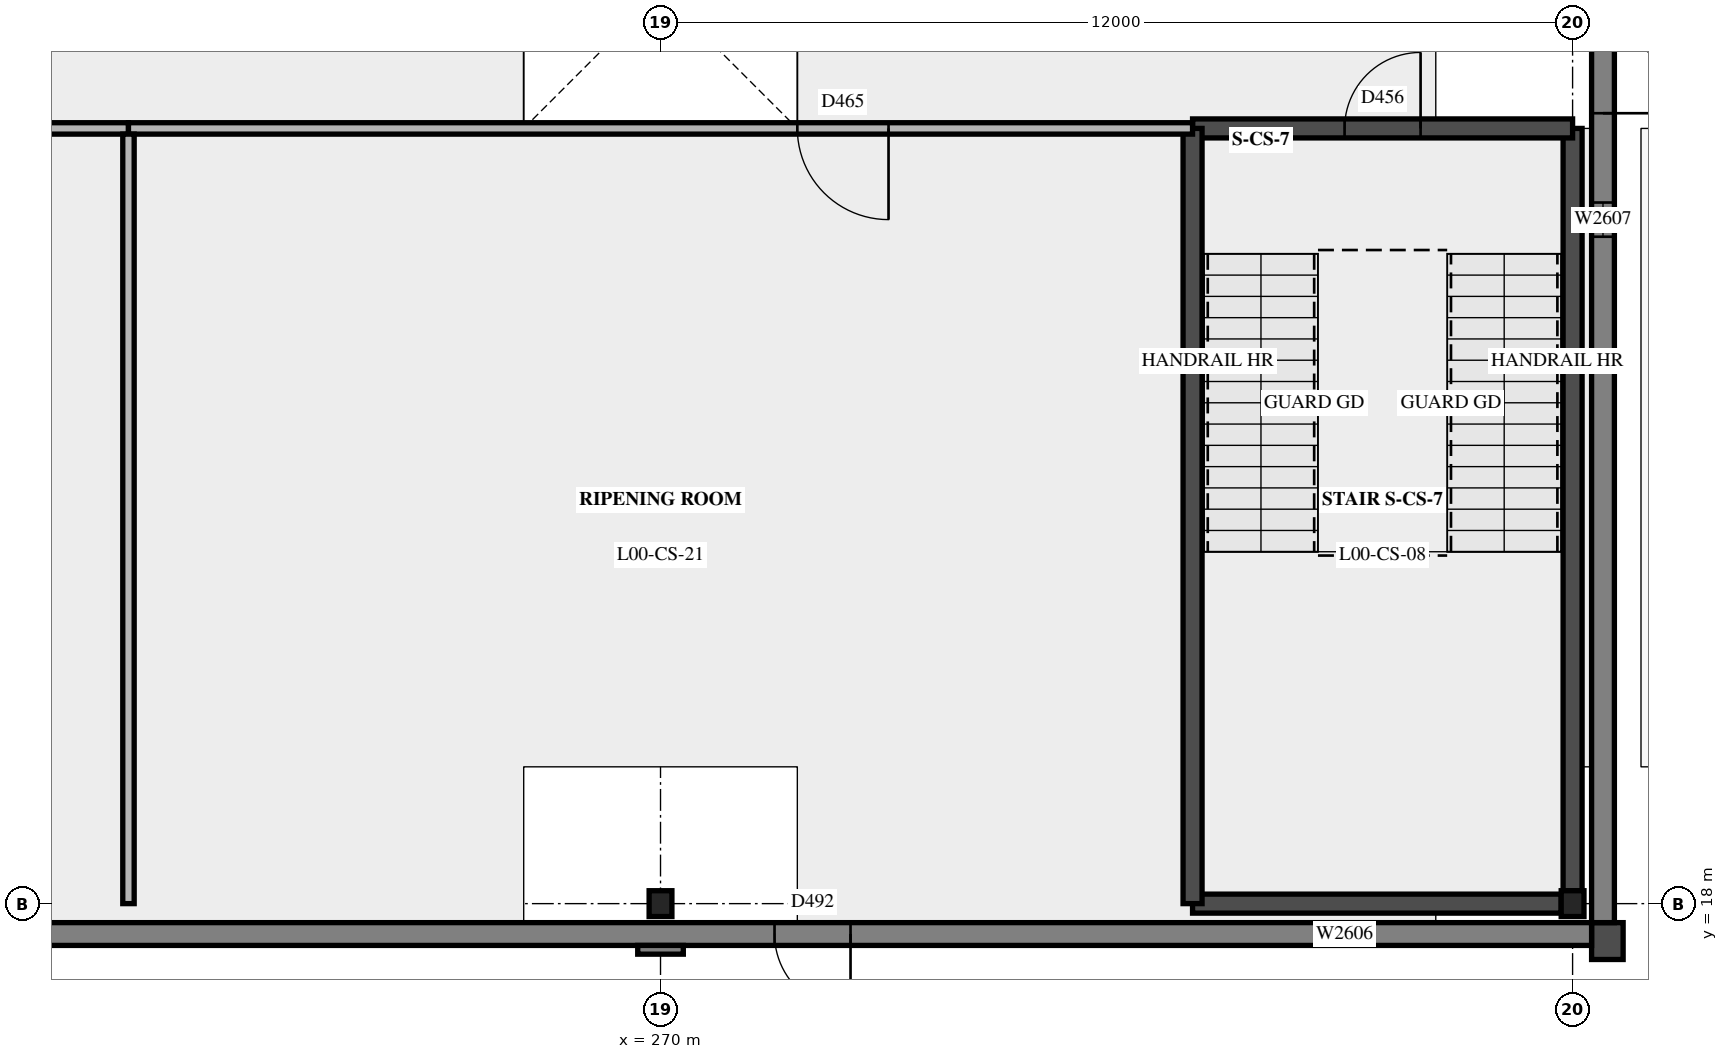
"""IFC4 building model, lengths in metres.
Left out: names, types, materials, properties, quantities, classifications, styles, units other than length and angle.
Written with IfcOpenShell. Run it as: python <this file> out.ifc"""

import sys

from ifc_helpers import new_model, si_unit, direction, frame, frame_2d, origin, origin_2d, place, context, subcontext, project, spatial, polyline, rectangle, i_section, outline, extrude, element, fill, save


model = new_model("IFC4")
c1 = context("Model", 3, precision=1e-05, world=origin(), true_north=direction((0.0, 1.0)))
c2 = subcontext(c1, "Body", "Model", "MODEL_VIEW")
j1 = project(units=[si_unit("LENGTHUNIT", "METRE"), si_unit("PLANEANGLEUNIT", "RADIAN")], contexts=[c1])
p1 = place(None, origin())
s1 = spatial("IfcSite", under=j1, at=p1, CompositionType="ELEMENT")
p2 = place(p1, origin())
s2 = spatial("IfcBuilding", under=s1, at=p2, CompositionType="ELEMENT")
p3 = place(p2, origin())
s3 = spatial("IfcBuildingStorey", under=s2, at=p3, CompositionType="ELEMENT", Elevation=0.0)
for number, where, z_axis, x_axis in (
    (1, (270.0, 18.0, 0.0), (0.0, 0.0, 1.0), (1.0, 0.0, 0.0)),
    (2, (282.0, 18.0, 0.0), (0.0, 0.0, 1.0), (1.0, 0.0, 0.0)),
):
    element("IfcColumn", number, at=place(p3, frame(where, z_axis=z_axis, x_axis=x_axis)), inside=s3, PredefinedType="COLUMN", context=c2, shape_type="SweptSolid", body=[
        extrude(i_section(OverallWidth=0.3, OverallDepth=0.34, WebThickness=0.012, FlangeThickness=0.021, at=origin_2d()), origin(), (0.0, 0.0, 1.0), 5.4),
    ])
p4 = place(p3, frame((277.0, 18.0, 0.0), z_axis=(0.0, 0.0, 1.0), x_axis=(1.0, 0.0, 0.0)))
e3 = element("IfcWall", 3, at=p4, inside=s3, PredefinedType="SHEAR", context=c2, shape_type="SweptSolid", body=[
    extrude(rectangle(XDim=4.85, YDim=0.25, at=frame_2d((2.425, 0.0))), origin(), (0.0, 0.0, 1.0), 5.4),
])
p5 = place(p3, frame((282.0, 18.17, 0.0), z_axis=(0.0, 0.0, 1.0), x_axis=(0.0, 1.0, 0.0)))
e4 = element("IfcWall", 4, at=p5, inside=s3, PredefinedType="SHEAR", context=c2, shape_type="SweptSolid", body=[
    extrude(rectangle(XDim=10.03, YDim=0.25, at=frame_2d((5.015, 0.0))), origin(), (0.0, 0.0, 1.0), 5.4),
])
p6 = place(p3, frame((277.0, 28.2, 0.0), z_axis=(0.0, 0.0, 1.0), x_axis=(1.0, 0.0, 0.0)))
e5 = element("IfcWall", 5, at=p6, inside=s3, PredefinedType="SHEAR", context=c2, shape_type="SweptSolid", body=[
    extrude(rectangle(XDim=5.0, YDim=0.25, at=frame_2d((2.5, 0.0))), origin(), (0.0, 0.0, 1.0), 5.4),
])
p7 = place(p6, frame((2.0, 0.0, 0.0)))
e6 = element("IfcOpeningElement", 6, at=p7, cuts=e5, PredefinedType="OPENING", context=c2, shape_type="SweptSolid", body=[
    extrude(rectangle(XDim=1.0, YDim=2.1, at=frame_2d((0.5, 1.05))), frame((0.0, 0.135, 0.0), z_axis=(0.0, -1.0, 0.0), x_axis=(1.0, 0.0, 0.0)), (0.0, 0.0, 1.0), 0.27),
])
p8 = place(p3, frame((277.0, 18.0, 0.0), z_axis=(0.0, 0.0, 1.0), x_axis=(0.0, 1.0, 0.0)))
e7 = element("IfcWall", 7, at=p8, inside=s3, PredefinedType="SHEAR", context=c2, shape_type="SweptSolid", body=[
    extrude(rectangle(XDim=10.2, YDim=0.25, at=frame_2d((5.1, 0.0))), origin(), (0.0, 0.0, 1.0), 5.4),
])
p9 = place(p3, frame((282.25, 17.508, 0.0), z_axis=(0.0, 0.0, 1.0), x_axis=(1.0, 0.0, 0.0)))
e8 = element("IfcWall", 8, at=p9, inside=s3, PredefinedType="SOLIDWALL", context=c2, shape_type="SweptSolid", body=[
    extrude(rectangle(XDim=0.415, YDim=0.485, at=frame_2d((0.208, 0.0))), origin(), (0.0, 0.0, 1.0), 5.01),
])
p10 = place(p3, frame((197.75, 17.6, 0.0), z_axis=(0.0, 0.0, 1.0), x_axis=(1.0, 0.0, 0.0)))
e9 = element("IfcWall", 9, at=p10, inside=s3, PredefinedType="SOLIDWALL", context=c2, shape_type="SweptSolid", body=[
    extrude(rectangle(XDim=84.5, YDim=0.3, at=frame_2d((42.25, 0.0))), origin(), (0.0, 0.0, 1.0), 5.4),
])
p11 = place(p10, frame((19.75, 0.0, 0.0), z_axis=(0.0, 0.0, 1.0), x_axis=(-1.0, 0.0, 0.0)))
e10 = element("IfcOpeningElement", 10, at=p11, cuts=e9, PredefinedType="OPENING", context=c2, shape_type="SweptSolid", body=[
    extrude(rectangle(XDim=1.0, YDim=2.1, at=frame_2d((0.5, 1.05))), frame((0.0, 0.16, 0.0), z_axis=(0.0, -1.0, 0.0), x_axis=(1.0, 0.0, 0.0)), (0.0, 0.0, 1.0), 0.32),
])
p12 = place(p10, frame((31.75, 0.0, 0.0), z_axis=(0.0, 0.0, 1.0), x_axis=(-1.0, 0.0, 0.0)))
e11 = element("IfcOpeningElement", 11, at=p12, cuts=e9, PredefinedType="OPENING", context=c2, shape_type="SweptSolid", body=[
    extrude(rectangle(XDim=1.0, YDim=2.1, at=frame_2d((0.5, 1.05))), frame((0.0, 0.16, 0.0), z_axis=(0.0, -1.0, 0.0), x_axis=(1.0, 0.0, 0.0)), (0.0, 0.0, 1.0), 0.32),
])
p13 = place(p10, frame((53.75, 0.0, 0.0), z_axis=(0.0, 0.0, 1.0), x_axis=(-1.0, 0.0, 0.0)))
e12 = element("IfcOpeningElement", 12, at=p13, cuts=e9, PredefinedType="OPENING", context=c2, shape_type="SweptSolid", body=[
    extrude(rectangle(XDim=1.0, YDim=2.1, at=frame_2d((0.5, 1.05))), frame((0.0, 0.16, 0.0), z_axis=(0.0, -1.0, 0.0), x_axis=(1.0, 0.0, 0.0)), (0.0, 0.0, 1.0), 0.32),
])
p14 = place(p10, frame((74.75, 0.0, 0.0), z_axis=(0.0, 0.0, 1.0), x_axis=(-1.0, 0.0, 0.0)))
e13 = element("IfcOpeningElement", 13, at=p14, cuts=e9, PredefinedType="OPENING", context=c2, shape_type="SweptSolid", body=[
    extrude(rectangle(XDim=1.0, YDim=2.1, at=frame_2d((0.5, 1.05))), frame((0.0, 0.16, 0.0), z_axis=(0.0, -1.0, 0.0), x_axis=(1.0, 0.0, 0.0)), (0.0, 0.0, 1.0), 0.32),
])
p15 = place(p10, frame((9.025, 0.0, 1.8)))
e14 = element("IfcOpeningElement", 14, at=p15, cuts=e9, PredefinedType="OPENING", context=c2, shape_type="SweptSolid", body=[
    extrude(rectangle(XDim=0.45, YDim=2.4, at=frame_2d((0.225, 1.2))), frame((0.0, 0.16, 0.0), z_axis=(0.0, -1.0, 0.0), x_axis=(1.0, 0.0, 0.0)), (0.0, 0.0, 1.0), 0.32),
])
p16 = place(p10, frame((33.025, 0.0, 1.8)))
e15 = element("IfcOpeningElement", 15, at=p16, cuts=e9, PredefinedType="OPENING", context=c2, shape_type="SweptSolid", body=[
    extrude(rectangle(XDim=0.45, YDim=2.4, at=frame_2d((0.225, 1.2))), frame((0.0, 0.16, 0.0), z_axis=(0.0, -1.0, 0.0), x_axis=(1.0, 0.0, 0.0)), (0.0, 0.0, 1.0), 0.32),
])
p17 = place(p10, frame((45.025, 0.0, 1.8)))
e16 = element("IfcOpeningElement", 16, at=p17, cuts=e9, PredefinedType="OPENING", context=c2, shape_type="SweptSolid", body=[
    extrude(rectangle(XDim=0.45, YDim=2.4, at=frame_2d((0.225, 1.2))), frame((0.0, 0.16, 0.0), z_axis=(0.0, -1.0, 0.0), x_axis=(1.0, 0.0, 0.0)), (0.0, 0.0, 1.0), 0.32),
])
p18 = place(p10, frame((57.025, 0.0, 1.8)))
e17 = element("IfcOpeningElement", 17, at=p18, cuts=e9, PredefinedType="OPENING", context=c2, shape_type="SweptSolid", body=[
    extrude(rectangle(XDim=0.45, YDim=2.4, at=frame_2d((0.225, 1.2))), frame((0.0, 0.16, 0.0), z_axis=(0.0, -1.0, 0.0), x_axis=(1.0, 0.0, 0.0)), (0.0, 0.0, 1.0), 0.32),
])
p19 = place(p10, frame((81.025, 0.0, 1.8)))
e18 = element("IfcOpeningElement", 18, at=p19, cuts=e9, PredefinedType="OPENING", context=c2, shape_type="SweptSolid", body=[
    extrude(rectangle(XDim=0.45, YDim=2.4, at=frame_2d((0.225, 1.2))), frame((0.0, 0.16, 0.0), z_axis=(0.0, -1.0, 0.0), x_axis=(1.0, 0.0, 0.0)), (0.0, 0.0, 1.0), 0.32),
])
p20 = place(p3, frame((269.7, 17.393, 0.0), z_axis=(0.0, 0.0, 1.0), x_axis=(1.0, 0.0, 0.0)))
e19 = element("IfcWall", 19, at=p20, inside=s3, PredefinedType="SOLIDWALL", context=c2, shape_type="SweptSolid", body=[
    extrude(rectangle(XDim=0.6, YDim=0.115, at=frame_2d((0.3, 0.0))), origin(), (0.0, 0.0, 1.0), 5.4),
])
p21 = place(p3, frame((282.4, 17.75, 0.0), z_axis=(0.0, 0.0, 1.0), x_axis=(0.0, 1.0, 0.0)))
e20 = element("IfcWall", 20, at=p21, inside=s3, PredefinedType="SOLIDWALL", context=c2, shape_type="SweptSolid", body=[
    extrude(rectangle(XDim=48.5, YDim=0.3, at=frame_2d((24.25, 0.0))), origin(), (0.0, 0.0, 1.0), 5.4),
])
p22 = place(p21, frame((11.65, 0.0, 0.0), z_axis=(0.0, 0.0, 1.0), x_axis=(-1.0, 0.0, 0.0)))
e21 = element("IfcOpeningElement", 21, at=p22, cuts=e20, PredefinedType="OPENING", context=c2, shape_type="SweptSolid", body=[
    extrude(rectangle(XDim=1.0, YDim=2.1, at=frame_2d((0.5, 1.05))), frame((0.0, 0.16, 0.0), z_axis=(0.0, -1.0, 0.0), x_axis=(1.0, 0.0, 0.0)), (0.0, 0.0, 1.0), 0.32),
])
p23 = place(p21, frame((23.85, 0.0, 0.0), z_axis=(0.0, 0.0, 1.0), x_axis=(-1.0, 0.0, 0.0)))
e22 = element("IfcOpeningElement", 22, at=p23, cuts=e20, PredefinedType="OPENING", context=c2, shape_type="SweptSolid", body=[
    extrude(rectangle(XDim=1.0, YDim=2.1, at=frame_2d((0.5, 1.05))), frame((0.0, 0.16, 0.0), z_axis=(0.0, -1.0, 0.0), x_axis=(1.0, 0.0, 0.0)), (0.0, 0.0, 1.0), 0.32),
])
p24 = place(p21, frame((9.025, 0.0, 1.8)))
e23 = element("IfcOpeningElement", 23, at=p24, cuts=e20, PredefinedType="OPENING", context=c2, shape_type="SweptSolid", body=[
    extrude(rectangle(XDim=0.45, YDim=2.4, at=frame_2d((0.225, 1.2))), frame((0.0, 0.16, 0.0), z_axis=(0.0, -1.0, 0.0), x_axis=(1.0, 0.0, 0.0)), (0.0, 0.0, 1.0), 0.32),
])
p25 = place(p21, frame((33.025, 0.0, 1.8)))
e24 = element("IfcOpeningElement", 24, at=p25, cuts=e20, PredefinedType="OPENING", context=c2, shape_type="SweptSolid", body=[
    extrude(rectangle(XDim=0.45, YDim=2.4, at=frame_2d((0.225, 1.2))), frame((0.0, 0.16, 0.0), z_axis=(0.0, -1.0, 0.0), x_axis=(1.0, 0.0, 0.0)), (0.0, 0.0, 1.0), 0.32),
])
p26 = place(p21, frame((45.025, 0.0, 1.8)))
e25 = element("IfcOpeningElement", 25, at=p26, cuts=e20, PredefinedType="OPENING", context=c2, shape_type="SweptSolid", body=[
    extrude(rectangle(XDim=0.45, YDim=2.4, at=frame_2d((0.225, 1.2))), frame((0.0, 0.16, 0.0), z_axis=(0.0, -1.0, 0.0), x_axis=(1.0, 0.0, 0.0)), (0.0, 0.0, 1.0), 0.32),
])
p27 = place(p3, frame((239.0, 28.2, 0.0), z_axis=(0.0, 0.0, 1.0), x_axis=(1.0, 0.0, 0.0)))
e26 = element("IfcWall", 26, at=p27, inside=s3, PredefinedType="PARTITIONING", context=c2, shape_type="SweptSolid", body=[
    extrude(outline(polyline([(0.0, 0.0), (24.0, 0.0), (24.0, 5.15), (23.905, 5.15), (23.9, 4.63), (23.7, 4.63), (23.695, 5.15), (21.505, 5.15), (21.5, 4.63), (21.3, 4.63), (21.295, 5.15), (19.1, 5.15), (19.095, 4.68), (18.905, 4.68), (18.9, 5.15), (16.705, 5.15), (16.7, 4.63), (16.5, 4.63), (16.495, 5.15), (14.305, 5.15), (14.3, 4.63), (14.1, 4.63), (14.095, 5.15), (11.905, 5.15), (11.9, 4.63), (11.7, 4.63), (11.695, 5.15), (9.505, 5.15), (9.5, 4.63), (9.3, 4.63), (9.295, 5.15), (7.1, 5.15), (7.095, 4.68), (6.905, 4.68), (6.9, 5.15), (4.705, 5.15), (4.7, 4.63), (4.5, 4.63), (4.495, 5.15), (2.305, 5.15), (2.3, 4.63), (2.1, 4.63), (2.095, 5.15), (0.0, 5.15), (0.0, 0.0)])), frame((0.0, 0.075, 0.0), z_axis=(0.0, -1.0, 0.0), x_axis=(1.0, 0.0, 0.0)), (0.0, 0.0, 1.0), 0.15),
])
p28 = place(p27, frame((11.4, 0.0, 0.0)))
e27 = element("IfcOpeningElement", 27, at=p28, cuts=e26, PredefinedType="OPENING", context=c2, shape_type="SweptSolid", body=[
    extrude(rectangle(XDim=1.2, YDim=2.4, at=frame_2d((0.6, 1.2))), frame((0.0, 0.085, 0.0), z_axis=(0.0, -1.0, 0.0), x_axis=(1.0, 0.0, 0.0)), (0.0, 0.0, 1.0), 0.17),
])
p29 = place(p3, frame((263.0, 28.2, 0.0), z_axis=(0.0, 0.0, 1.0), x_axis=(1.0, 0.0, 0.0)))
e28 = element("IfcWall", 28, at=p29, inside=s3, PredefinedType="PARTITIONING", context=c2, shape_type="SweptSolid", body=[
    extrude(outline(polyline([(0.0, 0.0), (14.0, 0.0), (14.0, 5.15), (11.905, 5.15), (11.9, 4.63), (11.7, 4.63), (11.695, 5.15), (9.505, 5.15), (9.5, 4.63), (9.3, 4.63), (9.295, 5.15), (7.1, 5.15), (7.095, 4.68), (6.905, 4.68), (6.9, 5.15), (4.705, 5.15), (4.7, 4.63), (4.5, 4.63), (4.495, 5.15), (2.305, 5.15), (2.3, 4.63), (2.1, 4.63), (2.095, 5.15), (0.0, 5.15), (0.0, 0.0)])), frame((0.0, 0.075, 0.0), z_axis=(0.0, -1.0, 0.0), x_axis=(1.0, 0.0, 0.0)), (0.0, 0.0, 1.0), 0.15),
])
p30 = place(p29, frame((8.8, 0.0, 0.0)))
e29 = element("IfcOpeningElement", 29, at=p30, cuts=e28, PredefinedType="OPENING", context=c2, shape_type="SweptSolid", body=[
    extrude(rectangle(XDim=1.2, YDim=2.4, at=frame_2d((0.6, 1.2))), frame((0.0, 0.085, 0.0), z_axis=(0.0, -1.0, 0.0), x_axis=(1.0, 0.0, 0.0)), (0.0, 0.0, 1.0), 0.17),
])
p31 = place(p3, frame((263.0, 18.0, 0.0), z_axis=(0.0, 0.0, 1.0), x_axis=(0.0, 1.0, 0.0)))
e30 = element("IfcWall", 30, at=p31, inside=s3, PredefinedType="PARTITIONING", context=c2, shape_type="SweptSolid", body=[
    extrude(outline(polyline([(0.0, 0.0), (10.125, 0.0), (10.125, 5.15), (0.105, 5.15), (0.1, 4.63), (0.0, 4.63), (0.0, 0.0)])), frame((0.0, 0.075, 0.0), z_axis=(0.0, -1.0, 0.0), x_axis=(1.0, 0.0, 0.0)), (0.0, 0.0, 1.0), 0.15),
])
p32 = place(p14, origin())
e31 = element("IfcDoor", 31, at=p32, inside=s3, OperationType="SINGLE_SWING_LEFT", PredefinedType="DOOR", context=c2, shape_type="SweptSolid", body=[
    extrude(rectangle(XDim=1.0, YDim=2.1, at=frame_2d((0.5, 1.05))), frame((0.0, 0.025, 0.0), z_axis=(0.0, -1.0, 0.0), x_axis=(1.0, 0.0, 0.0)), (0.0, 0.0, 1.0), 0.05),
])
fill(e13, e31)
p33 = place(p19, origin())
e32 = element("IfcWindow", 32, at=p33, inside=s3, PartitioningType="SINGLE_PANEL", PredefinedType="WINDOW", context=c2, shape_type="SweptSolid", body=[
    extrude(rectangle(XDim=0.45, YDim=2.4, at=frame_2d((0.225, 1.2))), frame((0.0, 0.03, 0.0), z_axis=(0.0, -1.0, 0.0), x_axis=(1.0, 0.0, 0.0)), (0.0, 0.0, 1.0), 0.06),
])
fill(e18, e32)
p34 = place(p22, origin())
e33 = element("IfcDoor", 33, at=p34, inside=s3, OperationType="SINGLE_SWING_RIGHT", PredefinedType="DOOR", context=c2, shape_type="SweptSolid", body=[
    extrude(rectangle(XDim=1.0, YDim=2.1, at=frame_2d((0.5, 1.05))), frame((0.0, 0.025, 0.0), z_axis=(0.0, -1.0, 0.0), x_axis=(1.0, 0.0, 0.0)), (0.0, 0.0, 1.0), 0.05),
])
fill(e21, e33)
p35 = place(p24, origin())
e34 = element("IfcWindow", 34, at=p35, inside=s3, PartitioningType="SINGLE_PANEL", PredefinedType="WINDOW", context=c2, shape_type="SweptSolid", body=[
    extrude(rectangle(XDim=0.45, YDim=2.4, at=frame_2d((0.225, 1.2))), frame((0.0, 0.03, 0.0), z_axis=(0.0, -1.0, 0.0), x_axis=(1.0, 0.0, 0.0)), (0.0, 0.0, 1.0), 0.06),
])
fill(e23, e34)
p36 = place(p7, origin())
e35 = element("IfcDoor", 35, at=p36, inside=s3, OperationType="SINGLE_SWING_RIGHT", PredefinedType="DOOR", context=c2, shape_type="SweptSolid", body=[
    extrude(rectangle(XDim=1.0, YDim=2.1, at=frame_2d((0.5, 1.05))), frame((0.0, 0.025, 0.0), z_axis=(0.0, -1.0, 0.0), x_axis=(1.0, 0.0, 0.0)), (0.0, 0.0, 1.0), 0.05),
])
fill(e6, e35)
p37 = place(p30, origin())
e36 = element("IfcDoor", 36, at=p37, inside=s3, OperationType="SINGLE_SWING_LEFT", PredefinedType="DOOR", context=c2, shape_type="SweptSolid", body=[
    extrude(rectangle(XDim=1.2, YDim=2.4, at=frame_2d((0.6, 1.2))), frame((0.0, 0.025, 0.0), z_axis=(0.0, -1.0, 0.0), x_axis=(1.0, 0.0, 0.0)), (0.0, 0.0, 1.0), 0.05),
])
fill(e29, e36)
save(model, sys.argv[1])
